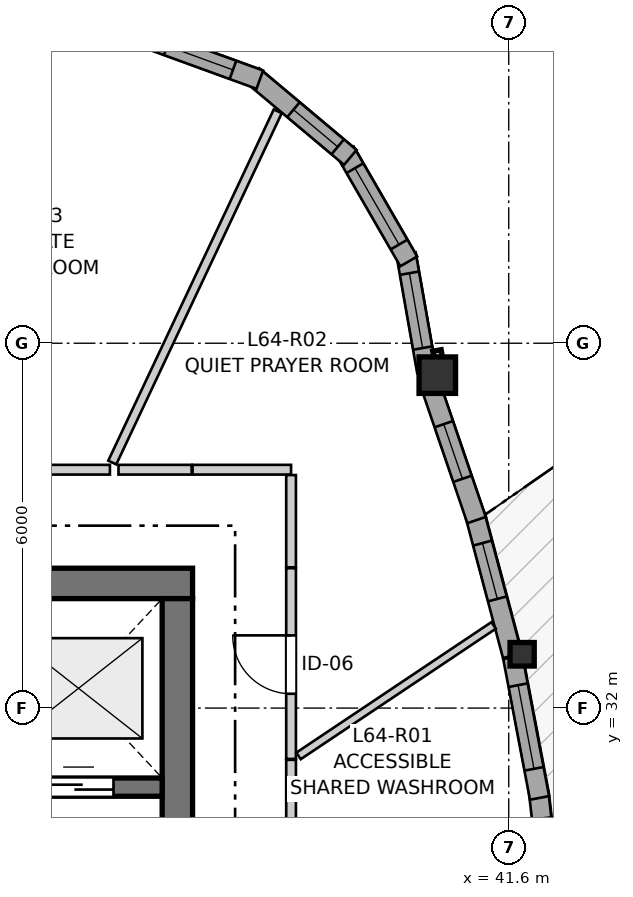
"""IFC4 building model, lengths in metres.
Left out: names, types, materials, properties, quantities, classifications, styles, units other than length and angle.
Written with IfcOpenShell. Run it as: python <this file> out.ifc"""

import sys

from ifc_helpers import new_model, si_unit, direction, frame, frame_2d, origin, origin_2d, place, context, subcontext, project, spatial, rectangle, i_section, extrude, source, transform, mapped, element, fill, save


model = new_model("IFC4")
c1 = context("Model", 3, precision=1e-05, world=origin(), true_north=direction((0.0, 1.0)))
c2 = subcontext(c1, "Body", "Model", "MODEL_VIEW")
j1 = project(units=[si_unit("LENGTHUNIT", "METRE"), si_unit("PLANEANGLEUNIT", "RADIAN")], contexts=[c1])
p1 = place(None, origin())
s1 = spatial("IfcSite", under=j1, at=p1, CompositionType="ELEMENT")
p2 = place(p1, origin())
s2 = spatial("IfcBuilding", under=s1, at=p2, CompositionType="ELEMENT")
p3 = place(p2, frame((0.0, 0.0, 214.8)))
s3 = spatial("IfcBuildingStorey", under=s2, at=p3, CompositionType="ELEMENT", Elevation=214.8)
p4 = place(p3, frame((36.4, 34.05, 0.0), z_axis=(0.0, 0.0, 1.0), x_axis=(-1.0, 0.0, 0.0)))
e1 = element("IfcWall", 1, at=p4, inside=s3, PredefinedType="SHEAR", context=c2, shape_type="SweptSolid", body=[
    extrude(rectangle(XDim=12.1, YDim=0.5, at=frame_2d((6.05, 0.0))), origin(), (0.0, 0.0, 1.0), 2.96),
])
p5 = place(p3, frame((36.15, 18.2, 0.0), z_axis=(0.0, 0.0, 1.0), x_axis=(0.0, 1.0, 0.0)))
e2 = element("IfcWall", 2, at=p5, inside=s3, PredefinedType="SHEAR", context=c2, shape_type="SweptSolid", body=[
    extrude(rectangle(XDim=15.6, YDim=0.5, at=frame_2d((7.8, 0.0))), origin(), (0.0, 0.0, 1.0), 2.96),
])
p6 = place(p5, frame((4.25, 0.0, 0.0)))
e3 = element("IfcOpeningElement", 3, at=p6, cuts=e2, PredefinedType="OPENING", context=c2, shape_type="SweptSolid", body=[
    extrude(rectangle(XDim=1.1, YDim=2.15, at=frame_2d((0.55, 1.075))), frame((0.0, 0.26, 0.0), z_axis=(0.0, -1.0, 0.0), x_axis=(1.0, 0.0, 0.0)), (0.0, 0.0, 1.0), 0.52),
])
p7 = place(p5, frame((10.25, 0.0, 0.0)))
e4 = element("IfcOpeningElement", 4, at=p7, cuts=e2, PredefinedType="OPENING", context=c2, shape_type="SweptSolid", body=[
    extrude(rectangle(XDim=1.1, YDim=2.15, at=frame_2d((0.55, 1.075))), frame((0.0, 0.26, 0.0), z_axis=(0.0, -1.0, 0.0), x_axis=(1.0, 0.0, 0.0)), (0.0, 0.0, 1.0), 0.52),
])
p8 = place(p3, frame((24.8, 30.7, 0.0), z_axis=(0.0, 0.0, 1.0), x_axis=(1.0, 0.0, 0.0)))
e5 = element("IfcWall", 5, at=p8, inside=s3, PredefinedType="SHEAR", context=c2, shape_type="SweptSolid", body=[
    extrude(rectangle(XDim=11.1, YDim=0.3, at=frame_2d((5.55, 0.0))), origin(), (0.0, 0.0, 1.0), 2.96),
])
p9 = place(p8, frame((6.22, 0.0, 0.0)))
e6 = element("IfcOpeningElement", 6, at=p9, cuts=e5, PredefinedType="OPENING", context=c2, shape_type="SweptSolid", body=[
    extrude(rectangle(XDim=0.98, YDim=2.15, at=frame_2d((0.49, 1.075))), frame((0.0, 0.16, 0.0), z_axis=(0.0, -1.0, 0.0), x_axis=(1.0, 0.0, 0.0)), (0.0, 0.0, 1.0), 0.32),
])
p10 = place(p8, frame((9.15, 0.0, 0.0)))
e7 = element("IfcOpeningElement", 7, at=p10, cuts=e5, PredefinedType="OPENING", context=c2, shape_type="SweptSolid", body=[
    extrude(rectangle(XDim=1.15, YDim=2.15, at=frame_2d((0.575, 1.075))), frame((0.0, 0.16, 0.0), z_axis=(0.0, -1.0, 0.0), x_axis=(1.0, 0.0, 0.0)), (0.0, 0.0, 1.0), 0.32),
])
m1 = source(origin(), c2, "Body", "SweptSolid", [
    extrude(i_section(OverallWidth=0.398, OverallDepth=0.387, WebThickness=0.019, FlangeThickness=0.03, FilletRadius=0.015, at=origin_2d()), origin(), (0.0, 0.0, 1.0), 2.96),
])
p11 = place(p3, frame((41.82, 32.885, 0.0), z_axis=(0.0, 0.0, 1.0), x_axis=(1.0, 0.0, 0.0)))
e8 = element("IfcColumn", 8, at=p11, inside=s3, PredefinedType="PILASTER", context=c2, shape_type="MappedRepresentation", body=[
    mapped(m1, transform((0.0, 0.0, 0.0), x_axis=(1.0, 0.0, 0.0), y_axis=(0.0, 1.0, 0.0), z_axis=(0.0, 0.0, 1.0), scale=1.0)),
])
m2 = source(origin(), c2, "Body", "SweptSolid", [
    extrude(rectangle(XDim=0.6, YDim=0.6, at=origin_2d()), origin(), (0.0, 0.0, 1.0), 2.96),
])
p12 = place(p3, frame((40.425, 37.475, 0.0), z_axis=(0.0, 0.0, 1.0), x_axis=(1.0, 0.0, 0.0)))
e9 = element("IfcColumn", 9, at=p12, inside=s3, PredefinedType="COLUMN", context=c2, shape_type="MappedRepresentation", body=[
    mapped(m2, transform((0.0, 0.0, 0.0), x_axis=(1.0, 0.0, 0.0), y_axis=(0.0, 1.0, 0.0), z_axis=(0.0, 0.0, 1.0), scale=1.0)),
])
p13 = place(p3, frame((42.349, 28.366, 0.0), z_axis=(0.0, 0.0, 1.0), x_axis=(-0.113314829757, 0.99355913229, 0.0)))
e10 = element("IfcWall", 10, at=p13, inside=s3, PredefinedType="SOLIDWALL", context=c2, shape_type="SweptSolid", body=[
    extrude(rectangle(XDim=2.258, YDim=0.32, at=frame_2d((1.129, 0.0))), origin(), (0.0, 0.0, 1.0), 2.58),
])
p14 = place(p13, frame((0.83, 0.0, 0.0)))
e11 = element("IfcOpeningElement", 11, at=p14, cuts=e10, PredefinedType="OPENING", context=c2, shape_type="SweptSolid", body=[
    extrude(rectangle(XDim=1.0, YDim=2.1, at=frame_2d((0.5, 1.05))), frame((0.0, 0.17, 0.0), z_axis=(0.0, -1.0, 0.0), x_axis=(1.0, 0.0, 0.0)), (0.0, 0.0, 1.0), 0.34),
])
p15 = place(p3, frame((42.106, 30.523, 0.0), z_axis=(0.0, 0.0, 1.0), x_axis=(-0.186673658051, 0.982421979289, 0.0)))
e12 = element("IfcWall", 12, at=p15, inside=s3, PredefinedType="SOLIDWALL", context=c2, shape_type="SweptSolid", body=[
    extrude(rectangle(XDim=2.354, YDim=0.32, at=frame_2d((1.177, 0.0))), origin(), (0.0, 0.0, 1.0), 2.58),
])
p16 = place(p15, frame((0.487, 0.0, 0.82)))
e13 = element("IfcOpeningElement", 13, at=p16, cuts=e12, PredefinedType="OPENING", context=c2, shape_type="SweptSolid", body=[
    extrude(rectangle(XDim=1.4, YDim=1.35, at=frame_2d((0.7, 0.675))), frame((0.0, 0.17, 0.0), z_axis=(0.0, -1.0, 0.0), x_axis=(1.0, 0.0, 0.0)), (0.0, 0.0, 1.0), 0.34),
])
p17 = place(p3, frame((41.66, 32.863, 0.0), z_axis=(0.0, 0.0, 1.0), x_axis=(-0.257008511659, 0.966409139513, 0.0)))
e14 = element("IfcWall", 14, at=p17, inside=s3, PredefinedType="SOLIDWALL", context=c2, shape_type="SweptSolid", body=[
    extrude(rectangle(XDim=2.393, YDim=0.32, at=frame_2d((1.196, 0.0))), origin(), (0.0, 0.0, 1.0), 2.58),
])
p18 = place(p17, frame((0.965, 0.0, 0.82)))
e15 = element("IfcOpeningElement", 15, at=p18, cuts=e14, PredefinedType="OPENING", context=c2, shape_type="SweptSolid", body=[
    extrude(rectangle(XDim=0.95, YDim=1.35, at=frame_2d((0.475, 0.675))), frame((0.0, 0.17, 0.0), z_axis=(0.0, -1.0, 0.0), x_axis=(1.0, 0.0, 0.0)), (0.0, 0.0, 1.0), 0.34),
])
p19 = place(p3, frame((41.071, 35.092, 0.0), z_axis=(0.0, 0.0, 1.0), x_axis=(-0.323624668926, 0.946185538709, 0.0)))
e16 = element("IfcWall", 16, at=p19, inside=s3, PredefinedType="SOLIDWALL", context=c2, shape_type="SweptSolid", body=[
    extrude(rectangle(XDim=2.373, YDim=0.32, at=frame_2d((1.187, 0.0))), origin(), (0.0, 0.0, 1.0), 2.58),
])
p20 = place(p19, frame((0.717, 0.0, 0.82)))
e17 = element("IfcOpeningElement", 17, at=p20, cuts=e16, PredefinedType="OPENING", context=c2, shape_type="SweptSolid", body=[
    extrude(rectangle(XDim=0.95, YDim=1.35, at=frame_2d((0.475, 0.675))), frame((0.0, 0.17, 0.0), z_axis=(0.0, -1.0, 0.0), x_axis=(1.0, 0.0, 0.0)), (0.0, 0.0, 1.0), 0.34),
])
p21 = place(p3, frame((40.252, 37.536, 0.0), z_axis=(0.0, 0.0, 1.0), x_axis=(-0.173671780312, 0.984803590937, 0.0)))
e18 = element("IfcWall", 18, at=p21, inside=s3, PredefinedType="SOLIDWALL", context=c2, shape_type="SweptSolid", body=[
    extrude(rectangle(XDim=1.962, YDim=0.32, at=frame_2d((0.981, 0.0))), origin(), (0.0, 0.0, 1.0), 2.58),
])
p22 = place(p21, frame((0.391, 0.0, 0.82)))
e19 = element("IfcOpeningElement", 19, at=p22, cuts=e18, PredefinedType="OPENING", context=c2, shape_type="SweptSolid", body=[
    extrude(rectangle(XDim=1.25, YDim=1.35, at=frame_2d((0.625, 0.675))), frame((0.0, 0.17, 0.0), z_axis=(0.0, -1.0, 0.0), x_axis=(1.0, 0.0, 0.0)), (0.0, 0.0, 1.0), 0.34),
])
p23 = place(p3, frame((39.956, 39.346, 0.0), z_axis=(0.0, 0.0, 1.0), x_axis=(-0.499995423472, 0.866028046028, 0.0)))
e20 = element("IfcWall", 20, at=p23, inside=s3, PredefinedType="SOLIDWALL", context=c2, shape_type="SweptSolid", body=[
    extrude(rectangle(XDim=2.09, YDim=0.32, at=frame_2d((1.045, 0.0))), origin(), (0.0, 0.0, 1.0), 2.58),
])
p24 = place(p23, frame((0.32, 0.0, 0.82)))
e21 = element("IfcOpeningElement", 21, at=p24, cuts=e20, PredefinedType="OPENING", context=c2, shape_type="SweptSolid", body=[
    extrude(rectangle(XDim=1.45, YDim=1.25, at=frame_2d((0.725, 0.625))), frame((0.0, 0.17, 0.0), z_axis=(0.0, -1.0, 0.0), x_axis=(1.0, 0.0, 0.0)), (0.0, 0.0, 1.0), 0.34),
])
p25 = place(p3, frame((38.994, 41.056, 0.0), z_axis=(0.0, 0.0, 1.0), x_axis=(-0.766024572719, 0.642811289563, 0.0)))
e22 = element("IfcWall", 22, at=p25, inside=s3, PredefinedType="SOLIDWALL", context=c2, shape_type="SweptSolid", body=[
    extrude(rectangle(XDim=2.09, YDim=0.32, at=frame_2d((1.045, 0.0))), origin(), (0.0, 0.0, 1.0), 2.58),
])
p26 = place(p25, frame((0.271, 0.0, 0.82)))
e23 = element("IfcOpeningElement", 23, at=p26, cuts=e22, PredefinedType="OPENING", context=c2, shape_type="SweptSolid", body=[
    extrude(rectangle(XDim=0.95, YDim=1.35, at=frame_2d((0.475, 0.675))), frame((0.0, 0.17, 0.0), z_axis=(0.0, -1.0, 0.0), x_axis=(1.0, 0.0, 0.0)), (0.0, 0.0, 1.0), 0.34),
])
p27 = place(p3, frame((37.506, 42.334, 0.0), z_axis=(0.0, 0.0, 1.0), x_axis=(-0.939711556618, 0.341968113072, 0.0)))
e24 = element("IfcWall", 24, at=p27, inside=s3, PredefinedType="SOLIDWALL", context=c2, shape_type="SweptSolid", body=[
    extrude(rectangle(XDim=2.09, YDim=0.32, at=frame_2d((1.045, 0.0))), origin(), (0.0, 0.0, 1.0), 2.58),
])
p28 = place(p27, frame((0.47, 0.0, 0.82)))
e25 = element("IfcOpeningElement", 25, at=p28, cuts=e24, PredefinedType="OPENING", context=c2, shape_type="SweptSolid", body=[
    extrude(rectangle(XDim=1.15, YDim=1.2, at=frame_2d((0.575, 0.6))), frame((0.0, 0.17, 0.0), z_axis=(0.0, -1.0, 0.0), x_axis=(1.0, 0.0, 0.0)), (0.0, 0.0, 1.0), 0.34),
])
p29 = place(p3, frame((29.938, 35.92, 0.0), z_axis=(0.0, 0.0, 1.0), x_axis=(1.0, 0.0, 0.0)))
e26 = element("IfcWall", 26, at=p29, inside=s3, PredefinedType="PARTITIONING", context=c2, shape_type="SweptSolid", body=[
    extrude(rectangle(XDim=5.103, YDim=0.16, at=frame_2d((2.552, 0.0))), origin(), (0.0, 0.0, 1.0), 2.628),
])
p30 = place(p29, frame((1.878, 0.0, 0.0)))
e27 = element("IfcOpeningElement", 27, at=p30, cuts=e26, PredefinedType="OPENING", context=c2, shape_type="SweptSolid", body=[
    extrude(rectangle(XDim=1.3, YDim=2.1, at=frame_2d((0.65, 1.05))), frame((0.0, 0.09, 0.0), z_axis=(0.0, -1.0, 0.0), x_axis=(1.0, 0.0, 0.0)), (0.0, 0.0, 1.0), 0.18),
])
p31 = place(p3, frame((38.02, 31.149, 0.0), z_axis=(0.0, 0.0, 1.0), x_axis=(0.0, -1.0, 0.0)))
e28 = element("IfcWall", 28, at=p31, inside=s3, PredefinedType="PARTITIONING", context=c2, shape_type="SweptSolid", body=[
    extrude(rectangle(XDim=3.279, YDim=0.16, at=frame_2d((1.639, 0.0))), origin(), (0.0, 0.0, 1.0), 2.628),
])
p32 = place(p31, frame((1.188, 0.0, 0.0)))
e29 = element("IfcOpeningElement", 29, at=p32, cuts=e28, PredefinedType="OPENING", context=c2, shape_type="SweptSolid", body=[
    extrude(rectangle(XDim=0.95, YDim=2.1, at=frame_2d((0.475, 1.05))), frame((0.0, 0.09, 0.0), z_axis=(0.0, -1.0, 0.0), x_axis=(1.0, 0.0, 0.0)), (0.0, 0.0, 1.0), 0.18),
])
p33 = place(p3, frame((38.02, 31.164, 0.0), z_axis=(0.0, 0.0, 1.0), x_axis=(0.0, 1.0, 0.0)))
e30 = element("IfcWall", 30, at=p33, inside=s3, PredefinedType="PARTITIONING", context=c2, shape_type="SweptSolid", body=[
    extrude(rectangle(XDim=3.136, YDim=0.16, at=frame_2d((1.568, 0.0))), origin(), (0.0, 0.0, 1.0), 2.628),
])
p34 = place(p33, frame((1.072, 0.0, 0.0)))
e31 = element("IfcOpeningElement", 31, at=p34, cuts=e30, PredefinedType="OPENING", context=c2, shape_type="SweptSolid", body=[
    extrude(rectangle(XDim=0.96, YDim=2.1, at=frame_2d((0.48, 1.05))), frame((0.0, 0.09, 0.0), z_axis=(0.0, -1.0, 0.0), x_axis=(1.0, 0.0, 0.0)), (0.0, 0.0, 1.0), 0.18),
])
p35 = place(p3, frame((35.08, 36.038, 0.0), z_axis=(0.0, 0.0, 1.0), x_axis=(0.426214985607, 0.904621902258, 0.0)))
e32 = element("IfcWall", 32, at=p35, inside=s3, PredefinedType="PARTITIONING", context=c2, shape_type="SweptSolid", body=[
    extrude(rectangle(XDim=6.385, YDim=0.145, at=frame_2d((3.192, 0.0))), origin(), (0.0, 0.0, 1.0), 2.96),
])
p36 = place(p3, frame((38.143, 31.213, 0.0), z_axis=(0.0, 0.0, 1.0), x_axis=(0.831154063558, 0.556042195009, 0.0)))
e33 = element("IfcWall", 33, at=p36, inside=s3, PredefinedType="PARTITIONING", context=c2, shape_type="SweptSolid", body=[
    extrude(rectangle(XDim=3.86, YDim=0.13, at=frame_2d((1.93, 0.0))), origin(), (0.0, 0.0, 1.0), 2.96),
])
p37 = place(p3, frame((36.4, 35.92, 0.0), z_axis=(0.0, 0.0, 1.0), x_axis=(1.0, 0.0, 0.0)))
e34 = element("IfcWall", 34, at=p37, inside=s3, PredefinedType="PARTITIONING", context=c2, shape_type="SweptSolid", body=[
    extrude(rectangle(XDim=1.62, YDim=0.16, at=frame_2d((0.81, 0.0))), origin(), (0.0, 0.0, 1.0), 2.96),
])
p38 = place(p3, frame((38.02, 34.315, 0.0), z_axis=(0.0, 0.0, 1.0), x_axis=(0.0, 1.0, 0.0)))
e35 = element("IfcWall", 35, at=p38, inside=s3, PredefinedType="PARTITIONING", context=c2, shape_type="SweptSolid", body=[
    extrude(rectangle(XDim=1.517, YDim=0.16, at=frame_2d((0.759, 0.0))), origin(), (0.0, 0.0, 1.0), 2.628),
])
p39 = place(p3, frame((35.182, 35.92, 0.0), z_axis=(0.0, 0.0, 1.0), x_axis=(1.0, 0.0, 0.0)))
e36 = element("IfcWall", 36, at=p39, inside=s3, PredefinedType="PARTITIONING", context=c2, shape_type="SweptSolid", body=[
    extrude(rectangle(XDim=1.203, YDim=0.16, at=frame_2d((0.602, 0.0))), origin(), (0.0, 0.0, 1.0), 2.96),
])
m3 = source(origin(), c2, "Body", "SweptSolid", [
    extrude(rectangle(XDim=1.4, YDim=1.35, at=frame_2d((0.7, 0.675))), frame((0.0, 0.03, 0.0), z_axis=(0.0, -1.0, 0.0), x_axis=(1.0, 0.0, 0.0)), (0.0, 0.0, 1.0), 0.06),
])
p40 = place(p16, origin())
e37 = element("IfcWindow", 37, at=p40, inside=s3, PartitioningType="SINGLE_PANEL", PredefinedType="WINDOW", context=c2, shape_type="MappedRepresentation", body=[
    mapped(m3, transform((0.0, 0.0, 0.0), x_axis=(1.0, 0.0, 0.0), y_axis=(0.0, 1.0, 0.0), z_axis=(0.0, 0.0, 1.0), scale=1.0)),
])
fill(e13, e37)
m4 = source(origin(), c2, "Body", "SweptSolid", [
    extrude(rectangle(XDim=0.95, YDim=1.35, at=frame_2d((0.475, 0.675))), frame((0.0, 0.03, 0.0), z_axis=(0.0, -1.0, 0.0), x_axis=(1.0, 0.0, 0.0)), (0.0, 0.0, 1.0), 0.06),
])
p41 = place(p18, origin())
e38 = element("IfcWindow", 38, at=p41, inside=s3, PartitioningType="SINGLE_PANEL", PredefinedType="WINDOW", context=c2, shape_type="MappedRepresentation", body=[
    mapped(m4, transform((0.0, 0.0, 0.0), x_axis=(1.0, 0.0, 0.0), y_axis=(0.0, 1.0, 0.0), z_axis=(0.0, 0.0, 1.0), scale=1.0)),
])
fill(e15, e38)
p42 = place(p20, origin())
e39 = element("IfcWindow", 39, at=p42, inside=s3, PartitioningType="SINGLE_PANEL", PredefinedType="WINDOW", context=c2, shape_type="MappedRepresentation", body=[
    mapped(m4, transform((0.0, 0.0, 0.0), x_axis=(1.0, 0.0, 0.0), y_axis=(0.0, 1.0, 0.0), z_axis=(0.0, 0.0, 1.0), scale=1.0)),
])
fill(e17, e39)
m5 = source(origin(), c2, "Body", "SweptSolid", [
    extrude(rectangle(XDim=1.25, YDim=1.35, at=frame_2d((0.625, 0.675))), frame((0.0, 0.03, 0.0), z_axis=(0.0, -1.0, 0.0), x_axis=(1.0, 0.0, 0.0)), (0.0, 0.0, 1.0), 0.06),
])
p43 = place(p22, origin())
e40 = element("IfcWindow", 40, at=p43, inside=s3, PartitioningType="SINGLE_PANEL", PredefinedType="WINDOW", context=c2, shape_type="MappedRepresentation", body=[
    mapped(m5, transform((0.0, 0.0, 0.0), x_axis=(1.0, 0.0, 0.0), y_axis=(0.0, 1.0, 0.0), z_axis=(0.0, 0.0, 1.0), scale=1.0)),
])
fill(e19, e40)
m6 = source(origin(), c2, "Body", "SweptSolid", [
    extrude(rectangle(XDim=1.45, YDim=1.25, at=frame_2d((0.725, 0.625))), frame((0.0, 0.03, 0.0), z_axis=(0.0, -1.0, 0.0), x_axis=(1.0, 0.0, 0.0)), (0.0, 0.0, 1.0), 0.06),
])
p44 = place(p24, origin())
e41 = element("IfcWindow", 41, at=p44, inside=s3, PartitioningType="SINGLE_PANEL", PredefinedType="WINDOW", context=c2, shape_type="MappedRepresentation", body=[
    mapped(m6, transform((0.0, 0.0, 0.0), x_axis=(1.0, 0.0, 0.0), y_axis=(0.0, 1.0, 0.0), z_axis=(0.0, 0.0, 1.0), scale=1.0)),
])
fill(e21, e41)
p45 = place(p26, origin())
e42 = element("IfcWindow", 42, at=p45, inside=s3, PartitioningType="SINGLE_PANEL", PredefinedType="WINDOW", context=c2, shape_type="MappedRepresentation", body=[
    mapped(m4, transform((0.0, 0.0, 0.0), x_axis=(1.0, 0.0, 0.0), y_axis=(0.0, 1.0, 0.0), z_axis=(0.0, 0.0, 1.0), scale=1.0)),
])
fill(e23, e42)
m7 = source(origin(), c2, "Body", "SweptSolid", [
    extrude(rectangle(XDim=1.15, YDim=1.2, at=frame_2d((0.575, 0.6))), frame((0.0, 0.03, 0.0), z_axis=(0.0, -1.0, 0.0), x_axis=(1.0, 0.0, 0.0)), (0.0, 0.0, 1.0), 0.06),
])
p46 = place(p28, origin())
e43 = element("IfcWindow", 43, at=p46, inside=s3, PartitioningType="SINGLE_PANEL", PredefinedType="WINDOW", context=c2, shape_type="MappedRepresentation", body=[
    mapped(m7, transform((0.0, 0.0, 0.0), x_axis=(1.0, 0.0, 0.0), y_axis=(0.0, 1.0, 0.0), z_axis=(0.0, 0.0, 1.0), scale=1.0)),
])
fill(e25, e43)
m8 = source(origin(), c2, "Body", "SweptSolid", [
    extrude(rectangle(XDim=1.15, YDim=2.15, at=frame_2d((0.575, 1.075))), frame((0.0, 0.025, 0.0), z_axis=(0.0, -1.0, 0.0), x_axis=(1.0, 0.0, 0.0)), (0.0, 0.0, 1.0), 0.05),
])
p47 = place(p10, origin())
e44 = element("IfcDoor", 44, at=p47, inside=s3, OperationType="DOUBLE_DOOR_SLIDING", PredefinedType="DOOR", context=c2, shape_type="MappedRepresentation", body=[
    mapped(m8, transform((0.0, 0.0, 0.0), x_axis=(1.0, 0.0, 0.0), y_axis=(0.0, 1.0, 0.0), z_axis=(0.0, 0.0, 1.0), scale=1.0)),
])
fill(e7, e44)
m9 = source(origin(), c2, "Body", "SweptSolid", [
    extrude(rectangle(XDim=0.96, YDim=2.1, at=frame_2d((0.48, 1.05))), frame((0.0, 0.025, 0.0), z_axis=(0.0, -1.0, 0.0), x_axis=(1.0, 0.0, 0.0)), (0.0, 0.0, 1.0), 0.05),
])
p48 = place(p34, origin())
e45 = element("IfcDoor", 45, at=p48, inside=s3, OperationType="SINGLE_SWING_RIGHT", PredefinedType="DOOR", context=c2, shape_type="MappedRepresentation", body=[
    mapped(m9, transform((0.0, 0.0, 0.0), x_axis=(1.0, 0.0, 0.0), y_axis=(0.0, 1.0, 0.0), z_axis=(0.0, 0.0, 1.0), scale=1.0)),
])
fill(e31, e45)
save(model, sys.argv[1])
